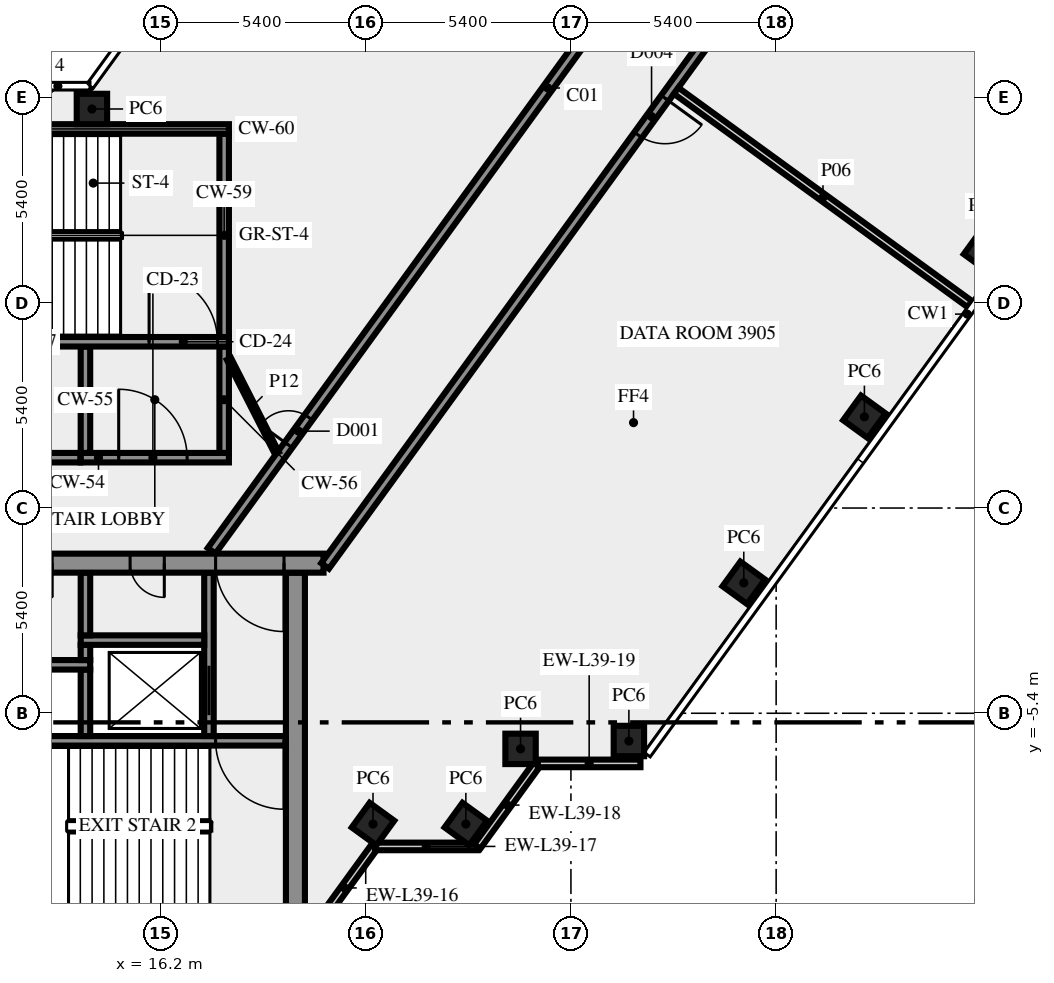
"""IFC4 building model, lengths in metres.
Left out: names, types, materials, properties, quantities, classifications, styles, units other than length and angle.
Written with IfcOpenShell. Run it as: python <this file> out.ifc"""

import sys

from ifc_helpers import new_model, si_unit, direction, frame, frame_2d, origin, origin_2d, place, context, subcontext, project, spatial, rectangle, extrude, element, fill, save


model = new_model("IFC4")
c1 = context("Model", 3, precision=1e-05, world=origin(), true_north=direction((0.0, 1.0)))
c2 = subcontext(c1, "Body", "Model", "MODEL_VIEW")
j1 = project(units=[si_unit("LENGTHUNIT", "METRE"), si_unit("PLANEANGLEUNIT", "RADIAN")], contexts=[c1])
p1 = place(None, origin())
s1 = spatial("IfcSite", under=j1, at=p1, CompositionType="ELEMENT")
p2 = place(p1, origin())
s2 = spatial("IfcBuilding", under=s1, at=p2, CompositionType="ELEMENT")
p3 = place(p2, frame((0.0, 0.0, 168.0)))
s3 = spatial("IfcBuildingStorey", under=s2, at=p3, CompositionType="ELEMENT", Elevation=168.0)
for number, where, z_axis, x_axis in (
    (1, (21.792, -8.315, 0.0), (0.0, 0.0, 1.0), (0.588, 0.809, 0.0)),
    (2, (24.235, -8.315, 0.0), (0.0, 0.0, 1.0), (0.588, 0.809, 0.0)),
    (3, (25.674, -6.337, 0.0), (0.0, 0.0, 1.0), (1.0, 0.0, 0.0)),
    (4, (28.525, -6.13, 0.0), (0.0, 0.0, 1.0), (1.0, 0.0, 0.0)),
    (5, (31.548, -1.969, 0.0), (0.0, 0.0, 1.0), (0.588, 0.809, 0.0)),
    (6, (34.722, 2.4, 0.0), (0.0, 0.0, 1.0), (0.588, 0.809, 0.0)),
    (7, (37.896, 6.769, 0.0), (0.0, 0.0, 1.0), (0.588, 0.809, 0.0)),
    (8, (14.395, 10.5, 0.0), (0.0, 0.0, 1.0), (-1.0, 0.0, 0.0)),
):
    element("IfcColumn", number, at=place(p3, frame(where, z_axis=z_axis, x_axis=x_axis)), inside=s3, PredefinedType="COLUMN", context=c2, shape_type="SweptSolid", body=[
        extrude(rectangle(XDim=0.8, YDim=0.8, at=origin_2d()), origin(), (0.0, 0.0, 1.0), 3.65),
    ])
p4 = place(p3, frame((20.253, -11.083, 0.0), z_axis=(0.0, 0.0, 1.0), x_axis=(0.587766567315, 0.809030569476, 0.0)))
e9 = element("IfcWall", 9, at=p4, inside=s3, PredefinedType="SOLIDWALL", context=c2, shape_type="SweptSolid", body=[
    extrude(rectangle(XDim=2.688, YDim=0.2, at=frame_2d((1.344, 0.0))), origin(), (0.0, 0.0, 1.0), 3.65),
])
p5 = place(p3, frame((21.843, -8.904, 0.0), z_axis=(0.0, 0.0, 1.0), x_axis=(1.0, 0.0, 0.0)))
e10 = element("IfcWall", 10, at=p5, inside=s3, PredefinedType="SOLIDWALL", context=c2, shape_type="SweptSolid", body=[
    extrude(rectangle(XDim=2.7, YDim=0.2, at=frame_2d((1.35, 0.0))), origin(), (0.0, 0.0, 1.0), 3.65),
])
p6 = place(p3, frame((24.533, -8.909, 0.0), z_axis=(0.0, 0.0, 1.0), x_axis=(0.587720002413, 0.809064397168, 0.0)))
e11 = element("IfcWall", 11, at=p6, inside=s3, PredefinedType="SOLIDWALL", context=c2, shape_type="SweptSolid", body=[
    extrude(rectangle(XDim=2.7, YDim=0.2, at=frame_2d((1.35, 0.0))), origin(), (0.0, 0.0, 1.0), 3.65),
])
p7 = place(p3, frame((26.13, -6.719, 0.0), z_axis=(0.0, 0.0, 1.0), x_axis=(1.0, 0.0, 0.0)))
e12 = element("IfcWall", 12, at=p7, inside=s3, PredefinedType="SOLIDWALL", context=c2, shape_type="SweptSolid", body=[
    extrude(rectangle(XDim=2.7, YDim=0.2, at=frame_2d((1.35, 0.0))), origin(), (0.0, 0.0, 1.0), 3.65),
])
p8 = place(p3, frame((19.75, -10.5, 0.0), z_axis=(0.0, 0.0, 1.0), x_axis=(0.0, 1.0, 0.0)))
e13 = element("IfcWall", 13, at=p8, inside=s3, PredefinedType="SHEAR", context=c2, shape_type="SweptSolid", body=[
    extrude(rectangle(XDim=8.8, YDim=0.5, at=frame_2d((4.4, 0.0))), origin(), (0.0, 0.0, 1.0), 3.65),
])
p9 = place(p3, frame((19.5, -6.125, 0.0), z_axis=(0.0, 0.0, 1.0), x_axis=(-1.0, 0.0, 0.0)))
e14 = element("IfcWall", 14, at=p9, inside=s3, PredefinedType="SHEAR", context=c2, shape_type="SweptSolid", body=[
    extrude(rectangle(XDim=8.05, YDim=0.25, at=frame_2d((4.025, 0.0))), origin(), (0.0, 0.0, 1.0), 3.65),
])
p10 = place(p9, frame((0.05, 0.0, 0.0)))
e15 = element("IfcOpeningElement", 15, at=p10, cuts=e14, PredefinedType="OPENING", context=c2, shape_type="SweptSolid", body=[
    extrude(rectangle(XDim=1.8, YDim=2.1, at=frame_2d((0.9, 1.05))), frame((0.0, 0.135, 0.0), z_axis=(0.0, -1.0, 0.0), x_axis=(1.0, 0.0, 0.0)), (0.0, 0.0, 1.0), 0.27),
])
p11 = place(p3, frame((14.225, -6.0, 0.0), z_axis=(0.0, 0.0, 1.0), x_axis=(0.0, 1.0, 0.0)))
e16 = element("IfcWall", 16, at=p11, inside=s3, PredefinedType="SHEAR", context=c2, shape_type="SweptSolid", body=[
    extrude(rectangle(XDim=1.75, YDim=0.25, at=frame_2d((0.875, 0.0))), origin(), (0.0, 0.0, 1.0), 3.65),
])
p12 = place(p3, frame((17.475, -6.0, 0.0), z_axis=(0.0, 0.0, 1.0), x_axis=(0.0, 1.0, 0.0)))
e17 = element("IfcWall", 17, at=p12, inside=s3, PredefinedType="SHEAR", context=c2, shape_type="SweptSolid", body=[
    extrude(rectangle(XDim=4.3, YDim=0.25, at=frame_2d((2.15, 0.0))), origin(), (0.0, 0.0, 1.0), 3.65),
])
p13 = place(p12, frame((0.55, 0.0, 0.0)))
e18 = element("IfcOpeningElement", 18, at=p13, cuts=e17, PredefinedType="OPENING", context=c2, shape_type="SweptSolid", body=[
    extrude(rectangle(XDim=1.3, YDim=2.1, at=frame_2d((0.65, 1.05))), frame((0.0, 0.135, 0.0), z_axis=(0.0, -1.0, 0.0), x_axis=(1.0, 0.0, 0.0)), (0.0, 0.0, 1.0), 0.27),
])
p14 = place(p3, frame((-0.6, -4.125, 0.0), z_axis=(0.0, 0.0, 1.0), x_axis=(1.0, 0.0, 0.0)))
e19 = element("IfcWall", 19, at=p14, inside=s3, PredefinedType="SHEAR", context=c2, shape_type="SweptSolid", body=[
    extrude(rectangle(XDim=14.95, YDim=0.25, at=frame_2d((7.475, 0.0))), origin(), (0.0, 0.0, 1.0), 3.65),
])
p15 = place(p14, frame((2.75, 0.0, 0.0)))
e20 = element("IfcOpeningElement", 20, at=p15, cuts=e19, PredefinedType="OPENING", context=c2, shape_type="SweptSolid", body=[
    extrude(rectangle(XDim=1.3, YDim=2.1, at=frame_2d((0.65, 1.05))), frame((0.0, 0.135, 0.0), z_axis=(0.0, -1.0, 0.0), x_axis=(1.0, 0.0, 0.0)), (0.0, 0.0, 1.0), 0.27),
])
p16 = place(p14, frame((5.35, 0.0, 0.0)))
e21 = element("IfcOpeningElement", 21, at=p16, cuts=e19, PredefinedType="OPENING", context=c2, shape_type="SweptSolid", body=[
    extrude(rectangle(XDim=1.1, YDim=2.1, at=frame_2d((0.55, 1.05))), frame((0.0, 0.135, 0.0), z_axis=(0.0, -1.0, 0.0), x_axis=(1.0, 0.0, 0.0)), (0.0, 0.0, 1.0), 0.27),
])
p17 = place(p14, frame((7.85, 0.0, 0.0)))
e22 = element("IfcOpeningElement", 22, at=p17, cuts=e19, PredefinedType="OPENING", context=c2, shape_type="SweptSolid", body=[
    extrude(rectangle(XDim=1.1, YDim=2.1, at=frame_2d((0.55, 1.05))), frame((0.0, 0.135, 0.0), z_axis=(0.0, -1.0, 0.0), x_axis=(1.0, 0.0, 0.0)), (0.0, 0.0, 1.0), 0.27),
])
p18 = place(p14, frame((10.35, 0.0, 0.0)))
e23 = element("IfcOpeningElement", 23, at=p18, cuts=e19, PredefinedType="OPENING", context=c2, shape_type="SweptSolid", body=[
    extrude(rectangle(XDim=1.1, YDim=2.1, at=frame_2d((0.55, 1.05))), frame((0.0, 0.135, 0.0), z_axis=(0.0, -1.0, 0.0), x_axis=(1.0, 0.0, 0.0)), (0.0, 0.0, 1.0), 0.27),
])
p19 = place(p3, frame((14.225, -4.0, 0.0), z_axis=(0.0, 0.0, 1.0), x_axis=(0.0, 1.0, 0.0)))
e24 = element("IfcWall", 24, at=p19, inside=s3, PredefinedType="SHEAR", context=c2, shape_type="SweptSolid", body=[
    extrude(rectangle(XDim=0.4, YDim=0.25, at=frame_2d((0.2, 0.0))), origin(), (0.0, 0.0, 1.0), 3.65),
])
p20 = place(p3, frame((14.1, -3.475, 0.0), z_axis=(0.0, 0.0, 1.0), x_axis=(1.0, 0.0, 0.0)))
e25 = element("IfcWall", 25, at=p20, inside=s3, PredefinedType="SHEAR", context=c2, shape_type="SweptSolid", body=[
    extrude(rectangle(XDim=3.25, YDim=0.25, at=frame_2d((1.625, 0.0))), origin(), (0.0, 0.0, 1.0), 3.65),
])
p21 = place(p3, frame((14.225, -3.35, 0.0), z_axis=(0.0, 0.0, 1.0), x_axis=(0.0, 1.0, 0.0)))
e26 = element("IfcWall", 26, at=p21, inside=s3, PredefinedType="SHEAR", context=c2, shape_type="SweptSolid", body=[
    extrude(rectangle(XDim=1.65, YDim=0.25, at=frame_2d((0.825, 0.0))), origin(), (0.0, 0.0, 1.0), 3.65),
])
p22 = place(p3, frame((20.49, -1.45, 0.0), z_axis=(0.0, 0.0, 1.0), x_axis=(-1.0, 0.0, 0.0)))
e27 = element("IfcWall", 27, at=p22, inside=s3, PredefinedType="SHEAR", context=c2, shape_type="SweptSolid", body=[
    extrude(rectangle(XDim=40.98, YDim=0.5, at=frame_2d((20.49, 0.0))), origin(), (0.0, 0.0, 1.0), 3.65),
])
p23 = place(p22, frame((38.14, 0.0, 0.0)))
e28 = element("IfcOpeningElement", 28, at=p23, cuts=e27, PredefinedType="OPENING", context=c2, shape_type="SweptSolid", body=[
    extrude(rectangle(XDim=1.8, YDim=2.1, at=frame_2d((0.9, 1.05))), frame((0.0, 0.26, 0.0), z_axis=(0.0, -1.0, 0.0), x_axis=(1.0, 0.0, 0.0)), (0.0, 0.0, 1.0), 0.52),
])
p24 = place(p22, frame((36.728, 0.0, 0.0)))
e29 = element("IfcOpeningElement", 29, at=p24, cuts=e27, PredefinedType="OPENING", context=c2, shape_type="SweptSolid", body=[
    extrude(rectangle(XDim=0.8, YDim=2.1, at=frame_2d((0.4, 1.05))), frame((0.0, 0.26, 0.0), z_axis=(0.0, -1.0, 0.0), x_axis=(1.0, 0.0, 0.0)), (0.0, 0.0, 1.0), 0.52),
])
p25 = place(p22, frame((35.153, 0.0, 0.0)))
e30 = element("IfcOpeningElement", 30, at=p25, cuts=e27, PredefinedType="OPENING", context=c2, shape_type="SweptSolid", body=[
    extrude(rectangle(XDim=0.8, YDim=2.1, at=frame_2d((0.4, 1.05))), frame((0.0, 0.26, 0.0), z_axis=(0.0, -1.0, 0.0), x_axis=(1.0, 0.0, 0.0)), (0.0, 0.0, 1.0), 0.52),
])
p26 = place(p22, frame((32.94, 0.0, 0.0)))
e31 = element("IfcOpeningElement", 31, at=p26, cuts=e27, PredefinedType="OPENING", context=c2, shape_type="SweptSolid", body=[
    extrude(rectangle(XDim=0.9, YDim=2.1, at=frame_2d((0.45, 1.05))), frame((0.0, 0.26, 0.0), z_axis=(0.0, -1.0, 0.0), x_axis=(1.0, 0.0, 0.0)), (0.0, 0.0, 1.0), 0.52),
])
p27 = place(p22, frame((27.84, 0.0, 0.0)))
e32 = element("IfcOpeningElement", 32, at=p27, cuts=e27, PredefinedType="OPENING", context=c2, shape_type="SweptSolid", body=[
    extrude(rectangle(XDim=0.9, YDim=2.1, at=frame_2d((0.45, 1.05))), frame((0.0, 0.26, 0.0), z_axis=(0.0, -1.0, 0.0), x_axis=(1.0, 0.0, 0.0)), (0.0, 0.0, 1.0), 0.52),
])
p28 = place(p22, frame((21.765, 0.0, 0.0)))
e33 = element("IfcOpeningElement", 33, at=p28, cuts=e27, PredefinedType="OPENING", context=c2, shape_type="SweptSolid", body=[
    extrude(rectangle(XDim=2.0, YDim=2.1, at=frame_2d((1.0, 1.05))), frame((0.0, 0.26, 0.0), z_axis=(0.0, -1.0, 0.0), x_axis=(1.0, 0.0, 0.0)), (0.0, 0.0, 1.0), 0.52),
])
p29 = place(p22, frame((7.14, 0.0, 0.0)))
e34 = element("IfcOpeningElement", 34, at=p29, cuts=e27, PredefinedType="OPENING", context=c2, shape_type="SweptSolid", body=[
    extrude(rectangle(XDim=0.9, YDim=2.1, at=frame_2d((0.45, 1.05))), frame((0.0, 0.26, 0.0), z_axis=(0.0, -1.0, 0.0), x_axis=(1.0, 0.0, 0.0)), (0.0, 0.0, 1.0), 0.52),
])
p30 = place(p22, frame((4.19, 0.0, 0.0)))
e35 = element("IfcOpeningElement", 35, at=p30, cuts=e27, PredefinedType="OPENING", context=c2, shape_type="SweptSolid", body=[
    extrude(rectangle(XDim=0.9, YDim=2.1, at=frame_2d((0.45, 1.05))), frame((0.0, 0.26, 0.0), z_axis=(0.0, -1.0, 0.0), x_axis=(1.0, 0.0, 0.0)), (0.0, 0.0, 1.0), 0.52),
])
p31 = place(p22, frame((1.04, 0.0, 0.0)))
e36 = element("IfcOpeningElement", 36, at=p31, cuts=e27, PredefinedType="OPENING", context=c2, shape_type="SweptSolid", body=[
    extrude(rectangle(XDim=1.8, YDim=2.1, at=frame_2d((0.9, 1.05))), frame((0.0, 0.26, 0.0), z_axis=(0.0, -1.0, 0.0), x_axis=(1.0, 0.0, 0.0)), (0.0, 0.0, 1.0), 0.52),
])
p32 = place(p3, frame((14.1, 1.325, 0.0), z_axis=(0.0, 0.0, 1.0), x_axis=(1.0, 0.0, 0.0)))
e37 = element("IfcWall", 37, at=p32, inside=s3, PredefinedType="SHEAR", context=c2, shape_type="SweptSolid", body=[
    extrude(rectangle(XDim=3.9, YDim=0.25, at=frame_2d((1.95, 0.0))), origin(), (0.0, 0.0, 1.0), 3.65),
])
p33 = place(p32, frame((1.0, 0.0, 0.0)))
e38 = element("IfcOpeningElement", 38, at=p33, cuts=e37, PredefinedType="OPENING", context=c2, shape_type="SweptSolid", body=[
    extrude(rectangle(XDim=1.8, YDim=2.1, at=frame_2d((0.9, 1.05))), frame((0.0, 0.135, 0.0), z_axis=(0.0, -1.0, 0.0), x_axis=(1.0, 0.0, 0.0)), (0.0, 0.0, 1.0), 0.27),
])
for number, where, z_axis, x_axis in (
    (39, (14.225, 1.45, 0.0), (0.0, 0.0, 1.0), (0.0, 1.0, 0.0)),
    (40, (17.875, 1.45, 0.0), (0.0, 0.0, 1.0), (0.0, 1.0, 0.0)),
):
    element("IfcWall", number, at=place(p3, frame(where, z_axis=z_axis, x_axis=x_axis)), inside=s3, PredefinedType="SHEAR", context=c2, shape_type="SweptSolid", body=[
        extrude(rectangle(XDim=2.8, YDim=0.25, at=frame_2d((1.4, 0.0))), origin(), (0.0, 0.0, 1.0), 3.65),
    ])
p34 = place(p3, frame((7.5, 4.375, 0.0), z_axis=(0.0, 0.0, 1.0), x_axis=(1.0, 0.0, 0.0)))
e41 = element("IfcWall", 41, at=p34, inside=s3, PredefinedType="SHEAR", context=c2, shape_type="SweptSolid", body=[
    extrude(rectangle(XDim=10.5, YDim=0.25, at=frame_2d((5.25, 0.0))), origin(), (0.0, 0.0, 1.0), 3.65),
])
p35 = place(p34, frame((8.4, 0.0, 0.0)))
e42 = element("IfcOpeningElement", 42, at=p35, cuts=e41, PredefinedType="OPENING", context=c2, shape_type="SweptSolid", body=[
    extrude(rectangle(XDim=1.8, YDim=2.1, at=frame_2d((0.9, 1.05))), frame((0.0, 0.135, 0.0), z_axis=(0.0, -1.0, 0.0), x_axis=(1.0, 0.0, 0.0)), (0.0, 0.0, 1.0), 0.27),
])
p36 = place(p3, frame((17.875, 4.5, 0.0), z_axis=(0.0, 0.0, 1.0), x_axis=(0.0, 1.0, 0.0)))
e43 = element("IfcWall", 43, at=p36, inside=s3, PredefinedType="SHEAR", context=c2, shape_type="SweptSolid", body=[
    extrude(rectangle(XDim=5.35, YDim=0.25, at=frame_2d((2.675, 0.0))), origin(), (0.0, 0.0, 1.0), 3.65),
])
p37 = place(p3, frame((7.5, 9.975, 0.0), z_axis=(0.0, 0.0, 1.0), x_axis=(1.0, 0.0, 0.0)))
e44 = element("IfcWall", 44, at=p37, inside=s3, PredefinedType="SHEAR", context=c2, shape_type="SweptSolid", body=[
    extrude(rectangle(XDim=10.5, YDim=0.25, at=frame_2d((5.25, 0.0))), origin(), (0.0, 0.0, 1.0), 3.65),
])
p38 = place(p37, frame((2.0, 0.0, 1.0)))
e45 = element("IfcOpeningElement", 45, at=p38, cuts=e44, PredefinedType="OPENING", context=c2, shape_type="SweptSolid", body=[
    extrude(rectangle(XDim=1.2, YDim=1.2, at=frame_2d((0.6, 0.6))), frame((0.0, 0.135, 0.0), z_axis=(0.0, -1.0, 0.0), x_axis=(1.0, 0.0, 0.0)), (0.0, 0.0, 1.0), 0.27),
])
p39 = place(p3, frame((17.545, -1.125, 0.0), z_axis=(0.0, 0.0, 1.0), x_axis=(0.587786330937, 0.809016210693, 0.0)))
e46 = element("IfcWall", 46, at=p39, inside=s3, PredefinedType="SOLIDWALL", context=c2, shape_type="SweptSolid", body=[
    extrude(rectangle(XDim=30.103, YDim=0.25, at=frame_2d((15.052, 0.0))), origin(), (0.0, 0.0, 1.0), 3.65),
])
p40 = place(p39, frame((3.441, 0.0, 0.0)))
e47 = element("IfcOpeningElement", 47, at=p40, cuts=e46, PredefinedType="OPENING", context=c2, shape_type="SweptSolid", body=[
    extrude(rectangle(XDim=0.9, YDim=2.1, at=frame_2d((0.45, 1.05))), frame((0.0, 0.135, 0.0), z_axis=(0.0, -1.0, 0.0), x_axis=(1.0, 0.0, 0.0)), (0.0, 0.0, 1.0), 0.27),
])
p41 = place(p39, frame((23.158, 0.0, 0.0)))
e48 = element("IfcOpeningElement", 48, at=p41, cuts=e46, PredefinedType="OPENING", context=c2, shape_type="SweptSolid", body=[
    extrude(rectangle(XDim=0.9, YDim=2.1, at=frame_2d((0.45, 1.05))), frame((0.0, 0.135, 0.0), z_axis=(0.0, -1.0, 0.0), x_axis=(1.0, 0.0, 0.0)), (0.0, 0.0, 1.0), 0.27),
])
p42 = place(p39, frame((21.558, 0.0, 0.0)))
e49 = element("IfcOpeningElement", 49, at=p42, cuts=e46, PredefinedType="OPENING", context=c2, shape_type="SweptSolid", body=[
    extrude(rectangle(XDim=0.9, YDim=2.1, at=frame_2d((0.45, 1.05))), frame((0.0, 0.135, 0.0), z_axis=(0.0, -1.0, 0.0), x_axis=(1.0, 0.0, 0.0)), (0.0, 0.0, 1.0), 0.27),
])
p43 = place(p3, frame((37.236, 21.469, 0.0), z_axis=(0.0, 0.0, 1.0), x_axis=(-0.58778344073, -0.809018310549, 0.0)))
e50 = element("IfcWall", 50, at=p43, inside=s3, PredefinedType="SOLIDWALL", context=c2, shape_type="SweptSolid", body=[
    extrude(rectangle(XDim=28.42, YDim=0.25, at=frame_2d((14.21, 0.0))), origin(), (0.0, 0.0, 1.0), 3.65),
])
p44 = place(p43, frame((13.205, 0.0, 0.0)))
e51 = element("IfcOpeningElement", 51, at=p44, cuts=e50, PredefinedType="OPENING", context=c2, shape_type="SweptSolid", body=[
    extrude(rectangle(XDim=1.2, YDim=2.1, at=frame_2d((0.6, 1.05))), frame((0.0, 0.135, 0.0), z_axis=(0.0, -1.0, 0.0), x_axis=(1.0, 0.0, 0.0)), (0.0, 0.0, 1.0), 0.27),
])
p45 = place(p43, frame((0.224, 0.0, 0.0)))
e52 = element("IfcOpeningElement", 52, at=p45, cuts=e50, PredefinedType="OPENING", context=c2, shape_type="SweptSolid", body=[
    extrude(rectangle(XDim=0.9, YDim=2.1, at=frame_2d((0.45, 1.05))), frame((0.0, 0.135, 0.0), z_axis=(0.0, -1.0, 0.0), x_axis=(1.0, 0.0, 0.0)), (0.0, 0.0, 1.0), 0.27),
])
p46 = place(p3, frame((6.754, 1.325, 0.0), z_axis=(0.0, 0.0, 1.0), x_axis=(1.0, 0.0, 0.0)))
e53 = element("IfcWall", 53, at=p46, inside=s3, PredefinedType="SOLIDWALL", context=c2, shape_type="SweptSolid", body=[
    extrude(rectangle(XDim=7.336, YDim=0.25, at=frame_2d((3.668, 0.0))), origin(), (0.0, 0.0, 1.0), 3.65),
])
p47 = place(p46, frame((0.346, 0.0, 0.0)))
e54 = element("IfcOpeningElement", 54, at=p47, cuts=e53, PredefinedType="OPENING", context=c2, shape_type="SweptSolid", body=[
    extrude(rectangle(XDim=0.9, YDim=2.1, at=frame_2d((0.45, 1.05))), frame((0.0, 0.135, 0.0), z_axis=(0.0, -1.0, 0.0), x_axis=(1.0, 0.0, 0.0)), (0.0, 0.0, 1.0), 0.27),
])
p48 = place(p3, frame((37.496, 5.367, 0.0), z_axis=(0.0, 0.0, 1.0), x_axis=(-0.809048817734, 0.587741448702, 0.0)))
e55 = element("IfcWall", 55, at=p48, inside=s3, PredefinedType="SOLIDWALL", context=c2, shape_type="SweptSolid", body=[
    extrude(rectangle(XDim=9.55, YDim=0.2, at=frame_2d((4.775, 0.0))), origin(), (0.0, 0.0, 1.0), 2.85),
])
p49 = place(p3, frame((18.0, 3.925, 0.0), z_axis=(0.0, 0.0, 1.0), x_axis=(0.453950796792, -0.891026752736, 0.0)))
e56 = element("IfcWall", 56, at=p49, inside=s3, PredefinedType="PARTITIONING", context=c2, shape_type="SweptSolid", body=[
    extrude(rectangle(XDim=2.778, YDim=0.12, at=frame_2d((1.389, 0.0))), origin(), (0.0, 0.0, 1.0), 3.65),
])
p50 = place(p10, origin())
e57 = element("IfcDoor", 57, at=p50, inside=s3, OperationType="DOUBLE_DOOR_SINGLE_SWING", PredefinedType="DOOR", context=c2, shape_type="SweptSolid", body=[
    extrude(rectangle(XDim=1.8, YDim=2.1, at=frame_2d((0.9, 1.05))), frame((0.0, 0.025, 0.0), z_axis=(0.0, -1.0, 0.0), x_axis=(1.0, 0.0, 0.0)), (0.0, 0.0, 1.0), 0.05),
])
fill(e15, e57)
p51 = place(p13, origin())
e58 = element("IfcDoor", 58, at=p51, inside=s3, OperationType="DOUBLE_DOOR_SLIDING", PredefinedType="DOOR", context=c2, shape_type="SweptSolid", body=[
    extrude(rectangle(XDim=1.3, YDim=2.1, at=frame_2d((0.65, 1.05))), frame((0.0, 0.025, 0.0), z_axis=(0.0, -1.0, 0.0), x_axis=(1.0, 0.0, 0.0)), (0.0, 0.0, 1.0), 0.05),
])
fill(e18, e58)
p52 = place(p30, origin())
e59 = element("IfcDoor", 59, at=p52, inside=s3, OperationType="SINGLE_SWING_LEFT", PredefinedType="DOOR", context=c2, shape_type="SweptSolid", body=[
    extrude(rectangle(XDim=0.9, YDim=2.1, at=frame_2d((0.45, 1.05))), frame((0.0, 0.025, 0.0), z_axis=(0.0, -1.0, 0.0), x_axis=(1.0, 0.0, 0.0)), (0.0, 0.0, 1.0), 0.05),
])
fill(e35, e59)
p53 = place(p31, origin())
e60 = element("IfcDoor", 60, at=p53, inside=s3, OperationType="DOUBLE_DOOR_SINGLE_SWING", PredefinedType="DOOR", context=c2, shape_type="SweptSolid", body=[
    extrude(rectangle(XDim=1.8, YDim=2.1, at=frame_2d((0.9, 1.05))), frame((0.0, 0.025, 0.0), z_axis=(0.0, -1.0, 0.0), x_axis=(1.0, 0.0, 0.0)), (0.0, 0.0, 1.0), 0.05),
])
fill(e36, e60)
p54 = place(p33, origin())
e61 = element("IfcDoor", 61, at=p54, inside=s3, OperationType="DOUBLE_DOOR_SINGLE_SWING", PredefinedType="DOOR", context=c2, shape_type="SweptSolid", body=[
    extrude(rectangle(XDim=1.8, YDim=2.1, at=frame_2d((0.9, 1.05))), frame((0.0, 0.025, 0.0), z_axis=(0.0, -1.0, 0.0), x_axis=(1.0, 0.0, 0.0)), (0.0, 0.0, 1.0), 0.05),
])
fill(e38, e61)
p55 = place(p35, origin())
e62 = element("IfcDoor", 62, at=p55, inside=s3, OperationType="DOUBLE_DOOR_SINGLE_SWING", PredefinedType="DOOR", context=c2, shape_type="SweptSolid", body=[
    extrude(rectangle(XDim=1.8, YDim=2.1, at=frame_2d((0.9, 1.05))), frame((0.0, 0.025, 0.0), z_axis=(0.0, -1.0, 0.0), x_axis=(1.0, 0.0, 0.0)), (0.0, 0.0, 1.0), 0.05),
])
fill(e42, e62)
p56 = place(p44, origin())
e63 = element("IfcDoor", 63, at=p56, inside=s3, OperationType="SINGLE_SWING_LEFT", PredefinedType="DOOR", context=c2, shape_type="SweptSolid", body=[
    extrude(rectangle(XDim=1.2, YDim=2.1, at=frame_2d((0.6, 1.05))), frame((0.0, 0.025, 0.0), z_axis=(0.0, -1.0, 0.0), x_axis=(1.0, 0.0, 0.0)), (0.0, 0.0, 1.0), 0.05),
])
fill(e51, e63)
p57 = place(p40, origin())
e64 = element("IfcDoor", 64, at=p57, inside=s3, OperationType="SINGLE_SWING_LEFT", PredefinedType="DOOR", context=c2, shape_type="SweptSolid", body=[
    extrude(rectangle(XDim=0.9, YDim=2.1, at=frame_2d((0.45, 1.05))), frame((0.0, 0.025, 0.0), z_axis=(0.0, -1.0, 0.0), x_axis=(1.0, 0.0, 0.0)), (0.0, 0.0, 1.0), 0.05),
])
fill(e47, e64)
save(model, sys.argv[1])
